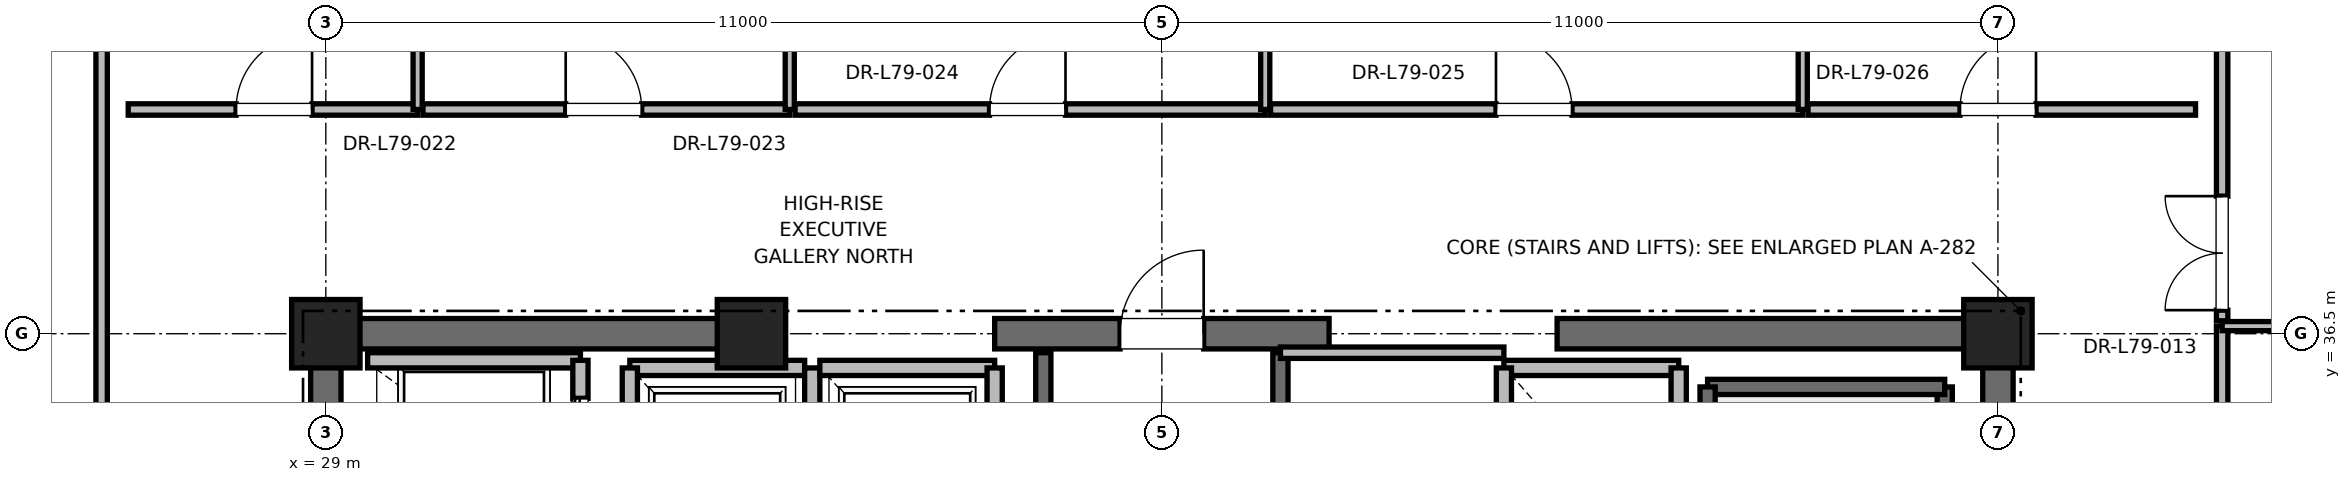
"""IFC4 building model, lengths in metres.
Left out: names, types, materials, properties, quantities, classifications, styles, units other than length and angle.
Written with IfcOpenShell. Run it as: python <this file> out.ifc"""

import sys

from ifc_helpers import new_model, si_unit, direction, frame, frame_2d, origin, origin_2d, place, context, subcontext, project, spatial, rectangle, extrude, element, fill, save


model = new_model("IFC4")
c1 = context("Model", 3, precision=1e-05, world=origin(), true_north=direction((0.0, 1.0)))
c2 = subcontext(c1, "Body", "Model", "MODEL_VIEW")
j1 = project(units=[si_unit("LENGTHUNIT", "METRE"), si_unit("PLANEANGLEUNIT", "RADIAN")], contexts=[c1])
p1 = place(None, origin())
s1 = spatial("IfcSite", under=j1, at=p1, CompositionType="ELEMENT")
p2 = place(p1, origin())
s2 = spatial("IfcBuilding", under=s1, at=p2, CompositionType="ELEMENT")
p3 = place(p2, frame((0.0, 0.0, 338.8)))
s3 = spatial("IfcBuildingStorey", under=s2, at=p3, CompositionType="ELEMENT", Elevation=338.8)
for number, where, z_axis, x_axis in (
    (1, (29.0, 36.5, 0.0), (0.0, 0.0, 1.0), (1.0, 0.0, 0.0)),
    (2, (51.0, 36.5, 0.0), (0.0, 0.0, 1.0), (1.0, 0.0, 0.0)),
    (3, (34.6, 36.5, 0.0), (0.0, 0.0, 1.0), (1.0, 0.0, 0.0)),
):
    element("IfcColumn", number, at=place(p3, frame(where, z_axis=z_axis, x_axis=x_axis)), inside=s3, PredefinedType="PILASTER", context=c2, shape_type="SweptSolid", body=[
        extrude(rectangle(XDim=0.9, YDim=0.9, at=origin_2d()), origin(), (0.0, 0.0, 1.0), 4.0),
    ])
p4 = place(p3, frame((29.0, 36.5, 0.0), z_axis=(0.0, 0.0, 1.0), x_axis=(1.0, 0.0, 0.0)))
e4 = element("IfcWall", 4, at=p4, inside=s3, PredefinedType="SHEAR", context=c2, shape_type="SweptSolid", body=[
    extrude(rectangle(XDim=5.8, YDim=0.4, at=frame_2d((2.9, 0.0))), origin(), (0.0, 0.0, 1.0), 3.7),
])
p5 = place(p3, frame((37.8, 36.5, 0.0), z_axis=(0.0, 0.0, 1.0), x_axis=(1.0, 0.0, 0.0)))
e5 = element("IfcWall", 5, at=p5, inside=s3, PredefinedType="SHEAR", context=c2, shape_type="SweptSolid", body=[
    extrude(rectangle(XDim=4.4, YDim=0.4, at=frame_2d((2.2, 0.0))), origin(), (0.0, 0.0, 1.0), 3.7),
])
p6 = place(p5, frame((1.65, 0.0, 0.0)))
e6 = element("IfcOpeningElement", 6, at=p6, cuts=e5, PredefinedType="OPENING", context=c2, shape_type="SweptSolid", body=[
    extrude(rectangle(XDim=1.1, YDim=2.15, at=frame_2d((0.55, 1.075))), frame((0.0, 0.2, 0.0), z_axis=(0.0, -1.0, 0.0), x_axis=(1.0, 0.0, 0.0)), (0.0, 0.0, 1.0), 0.4),
])
for number, where, z_axis, x_axis in (
    (7, (45.2, 36.5, 0.0), (0.0, 0.0, 1.0), (1.0, 0.0, 0.0)),
    (8, (29.0, 30.7, 0.0), (0.0, 0.0, 1.0), (0.0, 1.0, 0.0)),
):
    element("IfcWall", number, at=place(p3, frame(where, z_axis=z_axis, x_axis=x_axis)), inside=s3, PredefinedType="SHEAR", context=c2, shape_type="SweptSolid", body=[
        extrude(rectangle(XDim=5.8, YDim=0.4, at=frame_2d((2.9, 0.0))), origin(), (0.0, 0.0, 1.0), 3.7),
    ])
p7 = place(p3, frame((51.0, 27.7, 0.0), z_axis=(0.0, 0.0, 1.0), x_axis=(0.0, 1.0, 0.0)))
e9 = element("IfcWall", 9, at=p7, inside=s3, PredefinedType="SHEAR", context=c2, shape_type="SweptSolid", body=[
    extrude(rectangle(XDim=8.8, YDim=0.4, at=frame_2d((4.4, 0.0))), origin(), (0.0, 0.0, 1.0), 3.7),
])
p8 = place(p3, frame((50.3, 27.65, 0.0), z_axis=(0.0, 0.0, 1.0), x_axis=(0.0, 1.0, 0.0)))
e10 = element("IfcWall", 10, at=p8, inside=s3, PredefinedType="SOLIDWALL", context=c2, shape_type="SweptSolid", body=[
    extrude(rectangle(XDim=8.15, YDim=0.2, at=frame_2d((4.075, 0.0))), origin(), (0.0, 0.0, 1.0), 3.7),
])
p9 = place(p3, frame((47.18, 35.8, 0.0), z_axis=(0.0, 0.0, 1.0), x_axis=(1.0, 0.0, 0.0)))
e11 = element("IfcWall", 11, at=p9, inside=s3, PredefinedType="SOLIDWALL", context=c2, shape_type="SweptSolid", body=[
    extrude(rectangle(XDim=3.12, YDim=0.2, at=frame_2d((1.56, 0.0))), origin(), (0.0, 0.0, 1.0), 3.7),
])
p10 = place(p3, frame((47.18, 27.62, 0.0), z_axis=(0.0, 0.0, 1.0), x_axis=(0.0, 1.0, 0.0)))
e12 = element("IfcWall", 12, at=p10, inside=s3, PredefinedType="SOLIDWALL", context=c2, shape_type="SweptSolid", body=[
    extrude(rectangle(XDim=8.18, YDim=0.2, at=frame_2d((4.09, 0.0))), origin(), (0.0, 0.0, 1.0), 3.7),
])
p11 = place(p3, frame((38.44, 27.38, 0.0), z_axis=(0.0, 0.0, 1.0), x_axis=(0.0, 1.0, 0.0)))
e13 = element("IfcWall", 13, at=p11, inside=s3, PredefinedType="SOLIDWALL", context=c2, shape_type="SweptSolid", body=[
    extrude(rectangle(XDim=8.87, YDim=0.2, at=frame_2d((4.435, 0.0))), origin(), (0.0, 0.0, 1.0), 3.7),
])
p12 = place(p3, frame((41.56, 27.68, 0.0), z_axis=(0.0, 0.0, 1.0), x_axis=(0.0, 1.0, 0.0)))
e14 = element("IfcWall", 14, at=p12, inside=s3, PredefinedType="SOLIDWALL", context=c2, shape_type="SweptSolid", body=[
    extrude(rectangle(XDim=8.57, YDim=0.2, at=frame_2d((4.285, 0.0))), origin(), (0.0, 0.0, 1.0), 3.7),
])
p13 = place(p3, frame((32.35, 36.15, 0.0), z_axis=(0.0, 0.0, 1.0), x_axis=(-1.0, 0.0, 0.0)))
e15 = element("IfcWall", 15, at=p13, inside=s3, PredefinedType="SOLIDWALL", context=c2, shape_type="SweptSolid", body=[
    extrude(rectangle(XDim=2.8, YDim=0.2, at=frame_2d((1.4, 0.0))), origin(), (0.0, 0.0, 1.0), 2.753),
])
p14 = place(p3, frame((32.35, 34.05, 0.0), z_axis=(0.0, 0.0, 1.0), x_axis=(0.0, 1.0, 0.0)))
e16 = element("IfcWall", 16, at=p14, inside=s3, PredefinedType="SOLIDWALL", context=c2, shape_type="SweptSolid", body=[
    extrude(rectangle(XDim=2.1, YDim=0.2, at=frame_2d((1.05, 0.0))), origin(), (0.0, 0.0, 1.0), 3.7),
])
p15 = place(p14, frame((0.5, 0.0, 0.0)))
e17 = element("IfcOpeningElement", 17, at=p15, cuts=e16, PredefinedType="OPENING", context=c2, shape_type="SweptSolid", body=[
    extrude(rectangle(XDim=1.1, YDim=2.2, at=frame_2d((0.55, 1.1))), frame((0.0, 0.1, 0.0), z_axis=(0.0, -1.0, 0.0), x_axis=(1.0, 0.0, 0.0)), (0.0, 0.0, 1.0), 0.2),
])
p16 = place(p3, frame((35.3, 36.05, 0.0), z_axis=(0.0, 0.0, 1.0), x_axis=(-1.0, 0.0, 0.0)))
e18 = element("IfcWall", 18, at=p16, inside=s3, PredefinedType="SOLIDWALL", context=c2, shape_type="SweptSolid", body=[
    extrude(rectangle(XDim=2.3, YDim=0.2, at=frame_2d((1.15, 0.0))), origin(), (0.0, 0.0, 1.0), 2.78),
])
p17 = place(p3, frame((33.0, 36.05, 0.0), z_axis=(0.0, 0.0, 1.0), x_axis=(0.0, -1.0, 0.0)))
e19 = element("IfcWall", 19, at=p17, inside=s3, PredefinedType="SOLIDWALL", context=c2, shape_type="SweptSolid", body=[
    extrude(rectangle(XDim=2.6, YDim=0.2, at=frame_2d((1.3, 0.0))), origin(), (0.0, 0.0, 1.0), 3.7),
])
p18 = place(p3, frame((35.4, 33.45, 0.0), z_axis=(0.0, 0.0, 1.0), x_axis=(0.0, 1.0, 0.0)))
e20 = element("IfcWall", 20, at=p18, inside=s3, PredefinedType="SOLIDWALL", context=c2, shape_type="SweptSolid", body=[
    extrude(rectangle(XDim=2.6, YDim=0.2, at=frame_2d((1.3, 0.0))), origin(), (0.0, 0.0, 1.0), 2.78),
])
p19 = place(p3, frame((37.8, 36.05, 0.0), z_axis=(0.0, 0.0, 1.0), x_axis=(-1.0, 0.0, 0.0)))
e21 = element("IfcWall", 21, at=p19, inside=s3, PredefinedType="SOLIDWALL", context=c2, shape_type="SweptSolid", body=[
    extrude(rectangle(XDim=2.3, YDim=0.2, at=frame_2d((1.15, 0.0))), origin(), (0.0, 0.0, 1.0), 2.78),
])
p20 = place(p3, frame((37.8, 33.45, 0.0), z_axis=(0.0, 0.0, 1.0), x_axis=(0.0, 1.0, 0.0)))
e22 = element("IfcWall", 22, at=p20, inside=s3, PredefinedType="SOLIDWALL", context=c2, shape_type="SweptSolid", body=[
    extrude(rectangle(XDim=2.6, YDim=0.2, at=frame_2d((1.3, 0.0))), origin(), (0.0, 0.0, 1.0), 2.78),
])
p21 = place(p3, frame((46.8, 36.05, 0.0), z_axis=(0.0, 0.0, 1.0), x_axis=(-1.0, 0.0, 0.0)))
e23 = element("IfcWall", 23, at=p21, inside=s3, PredefinedType="SOLIDWALL", context=c2, shape_type="SweptSolid", body=[
    extrude(rectangle(XDim=2.3, YDim=0.2, at=frame_2d((1.15, 0.0))), origin(), (0.0, 0.0, 1.0), 2.78),
])
p22 = place(p3, frame((44.5, 36.05, 0.0), z_axis=(0.0, 0.0, 1.0), x_axis=(0.0, -1.0, 0.0)))
e24 = element("IfcWall", 24, at=p22, inside=s3, PredefinedType="SOLIDWALL", context=c2, shape_type="SweptSolid", body=[
    extrude(rectangle(XDim=2.6, YDim=0.2, at=frame_2d((1.3, 0.0))), origin(), (0.0, 0.0, 1.0), 2.78),
])
p23 = place(p3, frame((46.8, 33.45, 0.0), z_axis=(0.0, 0.0, 1.0), x_axis=(0.0, 1.0, 0.0)))
e25 = element("IfcWall", 25, at=p23, inside=s3, PredefinedType="SOLIDWALL", context=c2, shape_type="SweptSolid", body=[
    extrude(rectangle(XDim=2.6, YDim=0.2, at=frame_2d((1.3, 0.0))), origin(), (0.0, 0.0, 1.0), 3.7),
])
p24 = place(p3, frame((41.56, 36.25, 0.0), z_axis=(0.0, 0.0, 1.0), x_axis=(1.0, 0.0, 0.0)))
e26 = element("IfcWall", 26, at=p24, inside=s3, PredefinedType="PARTITIONING", context=c2, shape_type="SweptSolid", body=[
    extrude(rectangle(XDim=2.94, YDim=0.15, at=frame_2d((1.47, 0.0))), origin(), (0.0, 0.0, 1.0), 2.78),
])
p25 = place(p3, frame((26.4, 39.45, 0.0), z_axis=(0.0, 0.0, 1.0), x_axis=(1.0, 0.0, 0.0)))
e27 = element("IfcWall", 27, at=p25, inside=s3, PredefinedType="PARTITIONING", context=c2, shape_type="SweptSolid", body=[
    extrude(rectangle(XDim=3.808, YDim=0.15, at=frame_2d((1.904, 0.0))), origin(), (0.0, 0.0, 1.0), 2.753),
])
p26 = place(p25, frame((1.419, 0.0, 0.0)))
e28 = element("IfcOpeningElement", 28, at=p26, cuts=e27, PredefinedType="OPENING", context=c2, shape_type="SweptSolid", body=[
    extrude(rectangle(XDim=1.0, YDim=2.15, at=frame_2d((0.5, 1.075))), frame((0.0, 0.075, 0.0), z_axis=(0.0, -1.0, 0.0), x_axis=(1.0, 0.0, 0.0)), (0.0, 0.0, 1.0), 0.15),
])
p27 = place(p3, frame((30.208, 39.45, 0.0), z_axis=(0.0, 0.0, 1.0), x_axis=(0.0, 1.0, 0.0)))
e29 = element("IfcWall", 29, at=p27, inside=s3, PredefinedType="PARTITIONING", context=c2, shape_type="SweptSolid", body=[
    extrude(rectangle(XDim=9.15, YDim=0.12, at=frame_2d((4.575, 0.0))), origin(), (0.0, 0.0, 1.0), 2.33),
])
p28 = place(p3, frame((30.278, 39.45, 0.0), z_axis=(0.0, 0.0, 1.0), x_axis=(1.0, 0.0, 0.0)))
e30 = element("IfcWall", 30, at=p28, inside=s3, PredefinedType="PARTITIONING", context=c2, shape_type="SweptSolid", body=[
    extrude(rectangle(XDim=4.826, YDim=0.15, at=frame_2d((2.413, 0.0))), origin(), (0.0, 0.0, 1.0), 2.85),
])
p29 = place(p28, frame((1.878, 0.0, 0.0)))
e31 = element("IfcOpeningElement", 31, at=p29, cuts=e30, PredefinedType="OPENING", context=c2, shape_type="SweptSolid", body=[
    extrude(rectangle(XDim=1.0, YDim=2.15, at=frame_2d((0.5, 1.075))), frame((0.0, 0.075, 0.0), z_axis=(0.0, -1.0, 0.0), x_axis=(1.0, 0.0, 0.0)), (0.0, 0.0, 1.0), 0.15),
])
p30 = place(p3, frame((35.104, 39.45, 0.0), z_axis=(0.0, 0.0, 1.0), x_axis=(0.0, 1.0, 0.0)))
e32 = element("IfcWall", 32, at=p30, inside=s3, PredefinedType="PARTITIONING", context=c2, shape_type="SweptSolid", body=[
    extrude(rectangle(XDim=9.15, YDim=0.12, at=frame_2d((4.575, 0.0))), origin(), (0.0, 0.0, 1.0), 2.33),
])
p31 = place(p3, frame((35.174, 39.45, 0.0), z_axis=(0.0, 0.0, 1.0), x_axis=(1.0, 0.0, 0.0)))
e33 = element("IfcWall", 33, at=p31, inside=s3, PredefinedType="PARTITIONING", context=c2, shape_type="SweptSolid", body=[
    extrude(rectangle(XDim=6.186, YDim=0.15, at=frame_2d((3.093, 0.0))), origin(), (0.0, 0.0, 1.0), 2.85),
])
p32 = place(p31, frame((2.558, 0.0, 0.0)))
e34 = element("IfcOpeningElement", 34, at=p32, cuts=e33, PredefinedType="OPENING", context=c2, shape_type="SweptSolid", body=[
    extrude(rectangle(XDim=1.0, YDim=2.15, at=frame_2d((0.5, 1.075))), frame((0.0, 0.075, 0.0), z_axis=(0.0, -1.0, 0.0), x_axis=(1.0, 0.0, 0.0)), (0.0, 0.0, 1.0), 0.15),
])
p33 = place(p3, frame((41.36, 39.45, 0.0), z_axis=(0.0, 0.0, 1.0), x_axis=(0.0, 1.0, 0.0)))
e35 = element("IfcWall", 35, at=p33, inside=s3, PredefinedType="PARTITIONING", context=c2, shape_type="SweptSolid", body=[
    extrude(rectangle(XDim=9.15, YDim=0.12, at=frame_2d((4.575, 0.0))), origin(), (0.0, 0.0, 1.0), 2.33),
])
p34 = place(p3, frame((41.43, 39.45, 0.0), z_axis=(0.0, 0.0, 1.0), x_axis=(1.0, 0.0, 0.0)))
e36 = element("IfcWall", 36, at=p34, inside=s3, PredefinedType="PARTITIONING", context=c2, shape_type="SweptSolid", body=[
    extrude(rectangle(XDim=7.002, YDim=0.15, at=frame_2d((3.501, 0.0))), origin(), (0.0, 0.0, 1.0), 2.85),
])
p35 = place(p34, frame((2.966, 0.0, 0.0)))
e37 = element("IfcOpeningElement", 37, at=p35, cuts=e36, PredefinedType="OPENING", context=c2, shape_type="SweptSolid", body=[
    extrude(rectangle(XDim=1.0, YDim=2.15, at=frame_2d((0.5, 1.075))), frame((0.0, 0.075, 0.0), z_axis=(0.0, -1.0, 0.0), x_axis=(1.0, 0.0, 0.0)), (0.0, 0.0, 1.0), 0.15),
])
p36 = place(p3, frame((48.432, 39.45, 0.0), z_axis=(0.0, 0.0, 1.0), x_axis=(0.0, 1.0, 0.0)))
e38 = element("IfcWall", 38, at=p36, inside=s3, PredefinedType="PARTITIONING", context=c2, shape_type="SweptSolid", body=[
    extrude(rectangle(XDim=9.15, YDim=0.12, at=frame_2d((4.575, 0.0))), origin(), (0.0, 0.0, 1.0), 2.33),
])
p37 = place(p3, frame((48.502, 39.45, 0.0), z_axis=(0.0, 0.0, 1.0), x_axis=(1.0, 0.0, 0.0)))
e39 = element("IfcWall", 39, at=p37, inside=s3, PredefinedType="PARTITIONING", context=c2, shape_type="SweptSolid", body=[
    extrude(rectangle(XDim=5.098, YDim=0.15, at=frame_2d((2.549, 0.0))), origin(), (0.0, 0.0, 1.0), 2.753),
])
p38 = place(p37, frame((1.999, 0.0, 0.0)))
e40 = element("IfcOpeningElement", 40, at=p38, cuts=e39, PredefinedType="OPENING", context=c2, shape_type="SweptSolid", body=[
    extrude(rectangle(XDim=1.0, YDim=2.15, at=frame_2d((0.5, 1.075))), frame((0.0, 0.075, 0.0), z_axis=(0.0, -1.0, 0.0), x_axis=(1.0, 0.0, 0.0)), (0.0, 0.0, 1.0), 0.15),
])
p39 = place(p3, frame((26.05, 33.17, 0.0), z_axis=(0.0, 0.0, 1.0), x_axis=(0.0, 1.0, 0.0)))
e41 = element("IfcWall", 41, at=p39, inside=s3, PredefinedType="PARTITIONING", context=c2, shape_type="SweptSolid", body=[
    extrude(rectangle(XDim=11.83, YDim=0.15, at=frame_2d((5.915, 0.0))), origin(), (0.0, 0.0, 1.0), 2.753),
])
p40 = place(p39, frame((1.115, 0.0, 0.0)))
e42 = element("IfcOpeningElement", 42, at=p40, cuts=e41, PredefinedType="OPENING", context=c2, shape_type="SweptSolid", body=[
    extrude(rectangle(XDim=1.0, YDim=2.15, at=frame_2d((0.5, 1.075))), frame((0.0, 0.075, 0.0), z_axis=(0.0, -1.0, 0.0), x_axis=(1.0, 0.0, 0.0)), (0.0, 0.0, 1.0), 0.15),
])
p41 = place(p3, frame((53.95, 23.37, 0.0), z_axis=(0.0, 0.0, 1.0), x_axis=(0.0, 1.0, 0.0)))
e43 = element("IfcWall", 43, at=p41, inside=s3, PredefinedType="PARTITIONING", context=c2, shape_type="SweptSolid", body=[
    extrude(rectangle(XDim=13.23, YDim=0.15, at=frame_2d((6.615, 0.0))), origin(), (0.0, 0.0, 1.0), 2.753),
])
p42 = place(p41, frame((5.99, 0.0, 0.0)))
e44 = element("IfcOpeningElement", 44, at=p42, cuts=e43, PredefinedType="OPENING", context=c2, shape_type="SweptSolid", body=[
    extrude(rectangle(XDim=1.05, YDim=2.2, at=frame_2d((0.525, 1.1))), frame((0.0, 0.075, 0.0), z_axis=(0.0, -1.0, 0.0), x_axis=(1.0, 0.0, 0.0)), (0.0, 0.0, 1.0), 0.15),
])
p43 = place(p3, frame((53.95, 36.6, 0.0), z_axis=(0.0, 0.0, 1.0), x_axis=(1.0, 0.0, 0.0)))
e45 = element("IfcWall", 45, at=p43, inside=s3, PredefinedType="PARTITIONING", context=c2, shape_type="SweptSolid", body=[
    extrude(rectangle(XDim=9.95, YDim=0.12, at=frame_2d((4.975, 0.0))), origin(), (0.0, 0.0, 1.0), 2.753),
])
p44 = place(p3, frame((53.95, 36.67, 0.0), z_axis=(0.0, 0.0, 1.0), x_axis=(0.0, 1.0, 0.0)))
e46 = element("IfcWall", 46, at=p44, inside=s3, PredefinedType="PARTITIONING", context=c2, shape_type="SweptSolid", body=[
    extrude(rectangle(XDim=8.33, YDim=0.15, at=frame_2d((4.165, 0.0))), origin(), (0.0, 0.0, 1.0), 2.753),
])
p45 = place(p44, frame((0.14, 0.0, 0.0)))
e47 = element("IfcOpeningElement", 47, at=p45, cuts=e46, PredefinedType="OPENING", context=c2, shape_type="SweptSolid", body=[
    extrude(rectangle(XDim=1.5, YDim=2.25, at=frame_2d((0.75, 1.125))), frame((0.0, 0.075, 0.0), z_axis=(0.0, -1.0, 0.0), x_axis=(1.0, 0.0, 0.0)), (0.0, 0.0, 1.0), 0.15),
])
p46 = place(p6, origin())
e48 = element("IfcDoor", 48, at=p46, inside=s3, OperationType="SINGLE_SWING_RIGHT", PredefinedType="DOOR", context=c2, shape_type="SweptSolid", body=[
    extrude(rectangle(XDim=1.1, YDim=2.15, at=frame_2d((0.55, 1.075))), frame((0.0, 0.025, 0.0), z_axis=(0.0, -1.0, 0.0), x_axis=(1.0, 0.0, 0.0)), (0.0, 0.0, 1.0), 0.05),
])
fill(e6, e48)
p47 = place(p15, origin())
e49 = element("IfcDoor", 49, at=p47, inside=s3, OperationType="SLIDING_TO_RIGHT", PredefinedType="DOOR", context=c2, shape_type="SweptSolid", body=[
    extrude(rectangle(XDim=1.1, YDim=2.2, at=frame_2d((0.55, 1.1))), frame((0.0, 0.025, 0.0), z_axis=(0.0, -1.0, 0.0), x_axis=(1.0, 0.0, 0.0)), (0.0, 0.0, 1.0), 0.05),
])
fill(e17, e49)
p48 = place(p26, origin())
e50 = element("IfcDoor", 50, at=p48, inside=s3, OperationType="SINGLE_SWING_RIGHT", PredefinedType="DOOR", context=c2, shape_type="SweptSolid", body=[
    extrude(rectangle(XDim=1.0, YDim=2.15, at=frame_2d((0.5, 1.075))), frame((0.0, 0.025, 0.0), z_axis=(0.0, -1.0, 0.0), x_axis=(1.0, 0.0, 0.0)), (0.0, 0.0, 1.0), 0.05),
])
fill(e28, e50)
p49 = place(p29, origin())
e51 = element("IfcDoor", 51, at=p49, inside=s3, OperationType="SINGLE_SWING_LEFT", PredefinedType="DOOR", context=c2, shape_type="SweptSolid", body=[
    extrude(rectangle(XDim=1.0, YDim=2.15, at=frame_2d((0.5, 1.075))), frame((0.0, 0.025, 0.0), z_axis=(0.0, -1.0, 0.0), x_axis=(1.0, 0.0, 0.0)), (0.0, 0.0, 1.0), 0.05),
])
fill(e31, e51)
p50 = place(p32, origin())
e52 = element("IfcDoor", 52, at=p50, inside=s3, OperationType="SINGLE_SWING_RIGHT", PredefinedType="DOOR", context=c2, shape_type="SweptSolid", body=[
    extrude(rectangle(XDim=1.0, YDim=2.15, at=frame_2d((0.5, 1.075))), frame((0.0, 0.025, 0.0), z_axis=(0.0, -1.0, 0.0), x_axis=(1.0, 0.0, 0.0)), (0.0, 0.0, 1.0), 0.05),
])
fill(e34, e52)
p51 = place(p35, origin())
e53 = element("IfcDoor", 53, at=p51, inside=s3, OperationType="SINGLE_SWING_LEFT", PredefinedType="DOOR", context=c2, shape_type="SweptSolid", body=[
    extrude(rectangle(XDim=1.0, YDim=2.15, at=frame_2d((0.5, 1.075))), frame((0.0, 0.025, 0.0), z_axis=(0.0, -1.0, 0.0), x_axis=(1.0, 0.0, 0.0)), (0.0, 0.0, 1.0), 0.05),
])
fill(e37, e53)
p52 = place(p38, origin())
e54 = element("IfcDoor", 54, at=p52, inside=s3, OperationType="SINGLE_SWING_RIGHT", PredefinedType="DOOR", context=c2, shape_type="SweptSolid", body=[
    extrude(rectangle(XDim=1.0, YDim=2.15, at=frame_2d((0.5, 1.075))), frame((0.0, 0.025, 0.0), z_axis=(0.0, -1.0, 0.0), x_axis=(1.0, 0.0, 0.0)), (0.0, 0.0, 1.0), 0.05),
])
fill(e40, e54)
p53 = place(p45, origin())
e55 = element("IfcDoor", 55, at=p53, inside=s3, OperationType="DOUBLE_DOOR_SINGLE_SWING", PredefinedType="DOOR", context=c2, shape_type="SweptSolid", body=[
    extrude(rectangle(XDim=1.5, YDim=2.25, at=frame_2d((0.75, 1.125))), frame((0.0, 0.025, 0.0), z_axis=(0.0, -1.0, 0.0), x_axis=(1.0, 0.0, 0.0)), (0.0, 0.0, 1.0), 0.05),
])
fill(e47, e55)
save(model, sys.argv[1])
